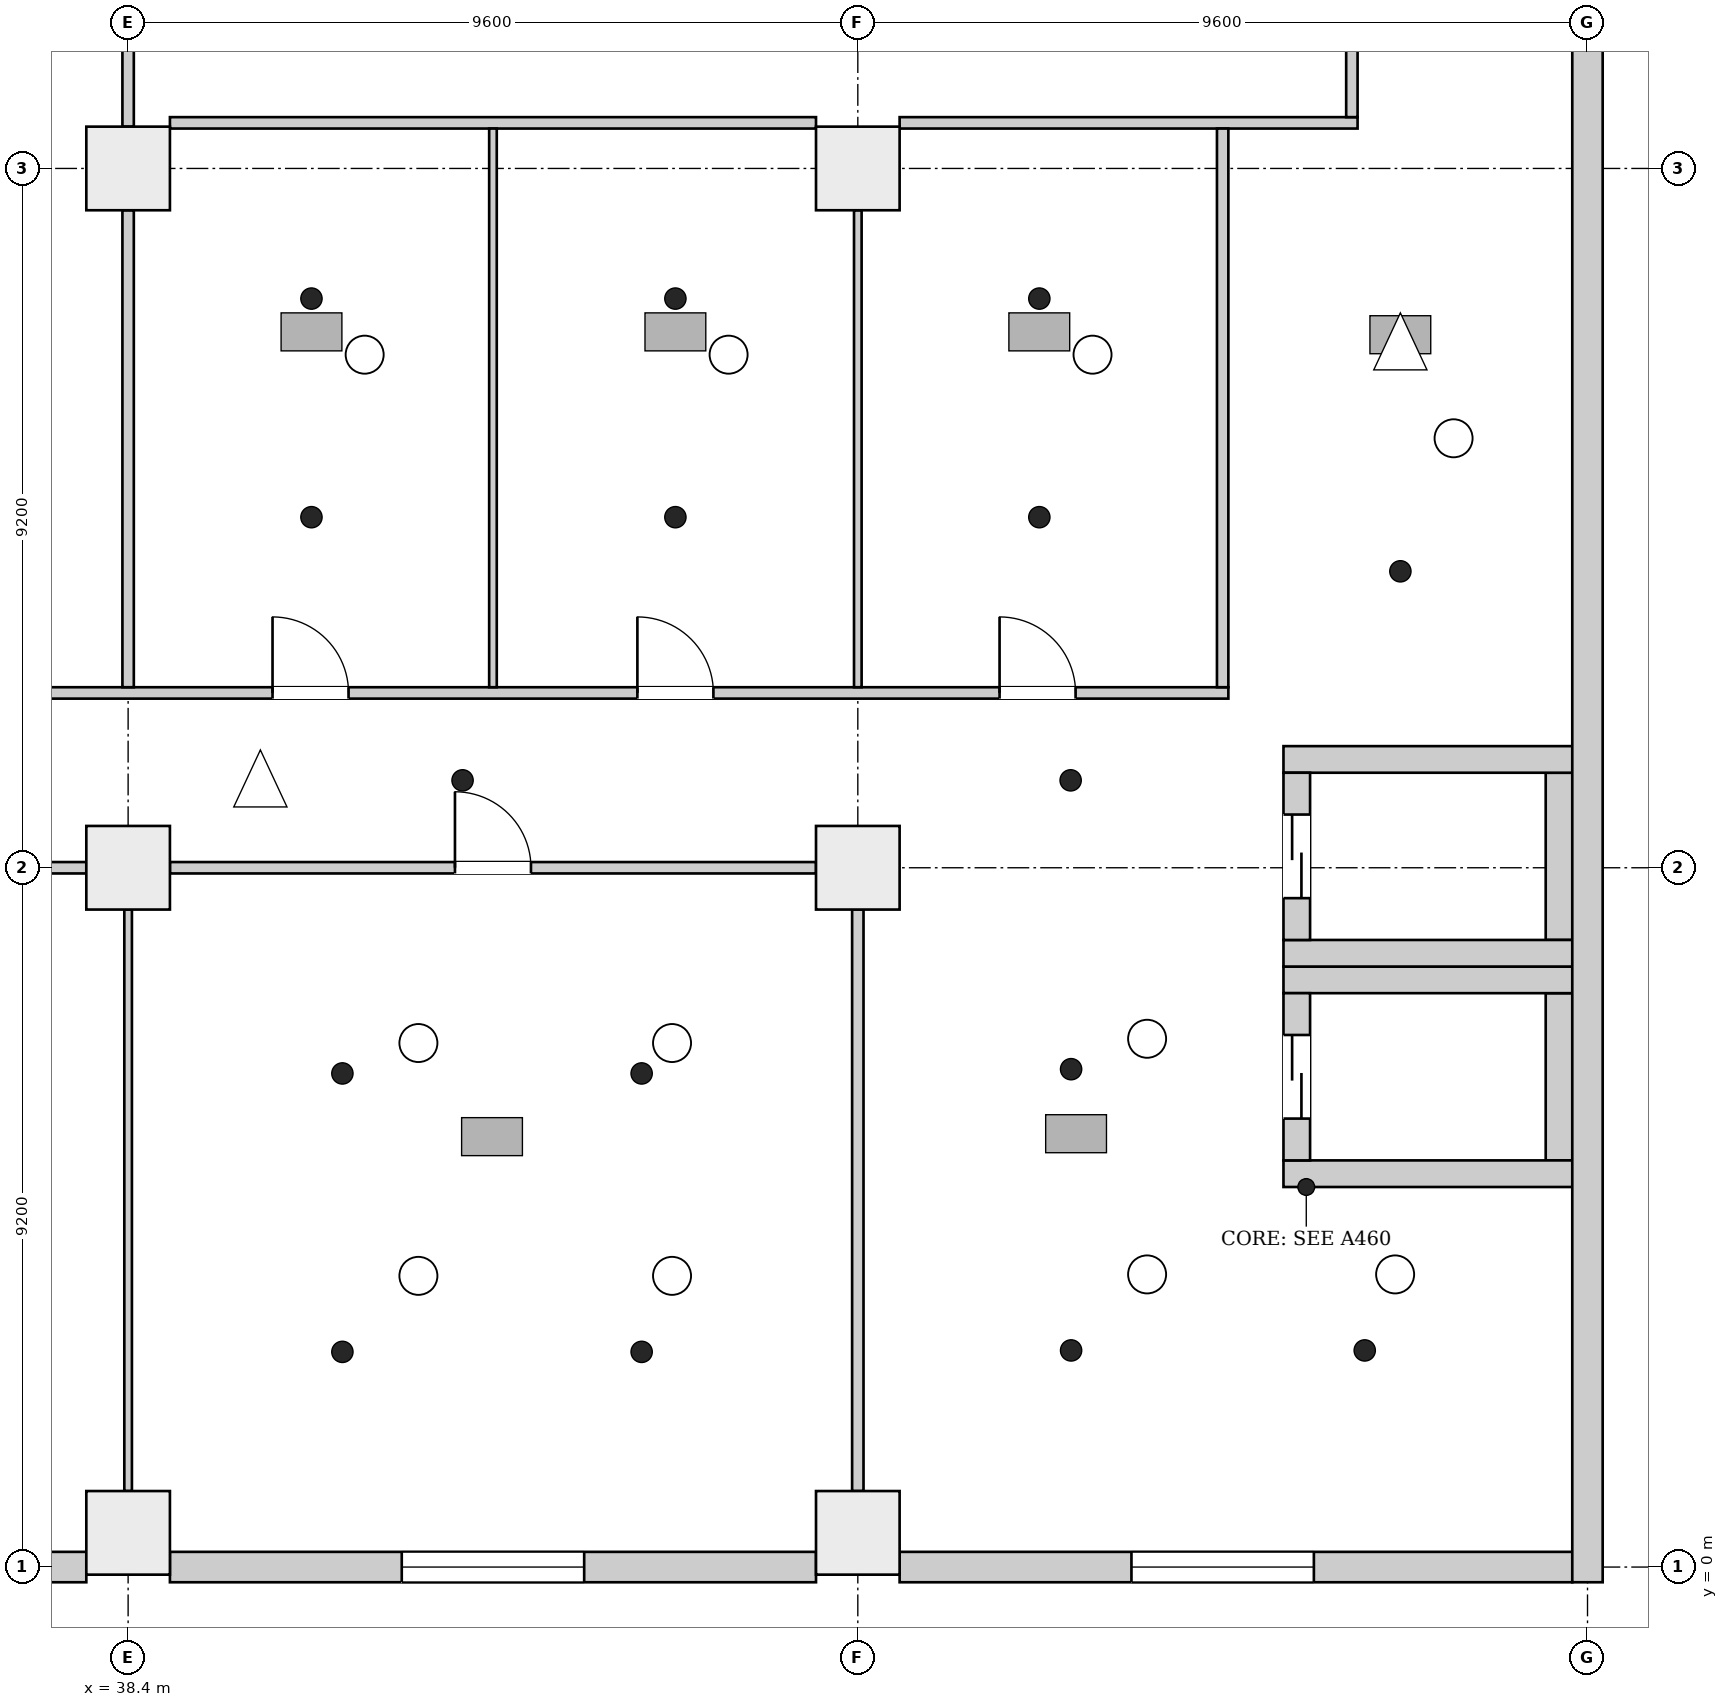
"""IFC4 building model, lengths in metres.
Left out: names, types, materials, properties, quantities, classifications, styles, units other than length and angle.
Written with IfcOpenShell. Run it as: python <this file> out.ifc"""

import sys

from ifc_helpers import new_model, si_unit, direction, frame, frame_2d, origin, origin_2d, place, context, subcontext, project, spatial, rectangle, extrude, element, fill, save


model = new_model("IFC4")
c1 = context("Model", 3, precision=1e-05, world=origin(), true_north=direction((0.0, 1.0)))
c2 = subcontext(c1, "Body", "Model", "MODEL_VIEW")
j1 = project(units=[si_unit("LENGTHUNIT", "METRE"), si_unit("PLANEANGLEUNIT", "RADIAN")], contexts=[c1])
p1 = place(None, origin())
s1 = spatial("IfcSite", under=j1, at=p1, CompositionType="ELEMENT")
p2 = place(p1, origin())
s2 = spatial("IfcBuilding", under=s1, at=p2, CompositionType="ELEMENT")
p3 = place(p2, frame((0.0, 0.0, 26.7)))
s3 = spatial("IfcBuildingStorey", under=s2, at=p3, CompositionType="ELEMENT", Elevation=26.7)
p4 = place(p3, frame((57.6, -0.2, 0.0), z_axis=(0.0, 0.0, 1.0), x_axis=(0.0, 1.0, 0.0)))
e1 = element("IfcWall", 1, at=p4, inside=s3, PredefinedType="SHEAR", context=c2, shape_type="SweptSolid", body=[
    extrude(rectangle(XDim=46.88, YDim=0.4, at=frame_2d((23.44, 0.0))), origin(), (0.0, 0.0, 1.0), 5.2),
])
for number, where, z_axis, x_axis in (
    (2, (53.6, 5.175, 0.0), (0.0, 0.0, 1.0), (1.0, 0.0, 0.0)),
    (3, (53.6, 7.725, 0.0), (0.0, 0.0, 1.0), (1.0, 0.0, 0.0)),
):
    element("IfcWall", number, at=place(p3, frame(where, z_axis=z_axis, x_axis=x_axis)), inside=s3, PredefinedType="SHEAR", context=c2, shape_type="SweptSolid", body=[
        extrude(rectangle(XDim=3.8, YDim=0.35, at=frame_2d((1.9, 0.0))), origin(), (0.0, 0.0, 1.0), 5.2),
    ])
p5 = place(p3, frame((53.775, 5.35, 0.0), z_axis=(0.0, 0.0, 1.0), x_axis=(0.0, 1.0, 0.0)))
e4 = element("IfcWall", 4, at=p5, inside=s3, PredefinedType="SHEAR", context=c2, shape_type="SweptSolid", body=[
    extrude(rectangle(XDim=2.2, YDim=0.35, at=frame_2d((1.1, 0.0))), origin(), (0.0, 0.0, 1.0), 5.2),
])
p6 = place(p5, frame((0.55, 0.0, 0.0)))
e5 = element("IfcOpeningElement", 5, at=p6, cuts=e4, PredefinedType="OPENING", context=c2, shape_type="SweptSolid", body=[
    extrude(rectangle(XDim=1.1, YDim=2.1, at=frame_2d((0.55, 1.05))), frame((0.0, 0.185, 0.0), z_axis=(0.0, -1.0, 0.0), x_axis=(1.0, 0.0, 0.0)), (0.0, 0.0, 1.0), 0.37),
])
p7 = place(p3, frame((57.225, 5.35, 0.0), z_axis=(0.0, 0.0, 1.0), x_axis=(0.0, 1.0, 0.0)))
e6 = element("IfcWall", 6, at=p7, inside=s3, PredefinedType="SHEAR", context=c2, shape_type="SweptSolid", body=[
    extrude(rectangle(XDim=2.2, YDim=0.35, at=frame_2d((1.1, 0.0))), origin(), (0.0, 0.0, 1.0), 5.2),
])
for number, where, z_axis, x_axis in (
    (7, (53.6, 8.075, 0.0), (0.0, 0.0, 1.0), (1.0, 0.0, 0.0)),
    (8, (53.6, 10.625, 0.0), (0.0, 0.0, 1.0), (1.0, 0.0, 0.0)),
):
    element("IfcWall", number, at=place(p3, frame(where, z_axis=z_axis, x_axis=x_axis)), inside=s3, PredefinedType="SHEAR", context=c2, shape_type="SweptSolid", body=[
        extrude(rectangle(XDim=3.8, YDim=0.35, at=frame_2d((1.9, 0.0))), origin(), (0.0, 0.0, 1.0), 5.2),
    ])
p8 = place(p3, frame((53.775, 8.25, 0.0), z_axis=(0.0, 0.0, 1.0), x_axis=(0.0, 1.0, 0.0)))
e9 = element("IfcWall", 9, at=p8, inside=s3, PredefinedType="SHEAR", context=c2, shape_type="SweptSolid", body=[
    extrude(rectangle(XDim=2.2, YDim=0.35, at=frame_2d((1.1, 0.0))), origin(), (0.0, 0.0, 1.0), 5.2),
])
p9 = place(p8, frame((0.55, 0.0, 0.0)))
e10 = element("IfcOpeningElement", 10, at=p9, cuts=e9, PredefinedType="OPENING", context=c2, shape_type="SweptSolid", body=[
    extrude(rectangle(XDim=1.1, YDim=2.1, at=frame_2d((0.55, 1.05))), frame((0.0, 0.185, 0.0), z_axis=(0.0, -1.0, 0.0), x_axis=(1.0, 0.0, 0.0)), (0.0, 0.0, 1.0), 0.37),
])
p10 = place(p3, frame((57.225, 8.25, 0.0), z_axis=(0.0, 0.0, 1.0), x_axis=(0.0, 1.0, 0.0)))
e11 = element("IfcWall", 11, at=p10, inside=s3, PredefinedType="SHEAR", context=c2, shape_type="SweptSolid", body=[
    extrude(rectangle(XDim=2.2, YDim=0.35, at=frame_2d((1.1, 0.0))), origin(), (0.0, 0.0, 1.0), 5.2),
])
for number, where, z_axis, x_axis in (
    (12, (38.4, 0.45, 0.0), (0.0, 0.0, 1.0), (1.0, 0.0, 0.0)),
    (13, (48.0, 0.45, 0.0), (0.0, 0.0, 1.0), (1.0, 0.0, 0.0)),
    (14, (38.4, 9.2, 0.0), (0.0, 0.0, 1.0), (1.0, 0.0, 0.0)),
    (15, (48.0, 9.2, 0.0), (0.0, 0.0, 1.0), (1.0, 0.0, 0.0)),
    (16, (38.4, 18.4, 0.0), (0.0, 0.0, 1.0), (1.0, 0.0, 0.0)),
    (17, (48.0, 18.4, 0.0), (0.0, 0.0, 1.0), (1.0, 0.0, 0.0)),
):
    element("IfcColumn", number, at=place(p3, frame(where, z_axis=z_axis, x_axis=x_axis)), inside=s3, PredefinedType="COLUMN", context=c2, shape_type="SweptSolid", body=[
        extrude(rectangle(XDim=1.1, YDim=1.1, at=origin_2d()), origin(), (0.0, 0.0, 1.0), 5.2),
    ])
p11 = place(p3, frame((29.35, 0.0, 0.0), z_axis=(0.0, 0.0, 1.0), x_axis=(1.0, 0.0, 0.0)))
e18 = element("IfcWall", 18, at=p11, inside=s3, PredefinedType="ELEMENTEDWALL", context=c2, shape_type="SweptSolid", body=[
    extrude(rectangle(XDim=8.5, YDim=0.4, at=frame_2d((4.25, 0.0))), origin(), (0.0, 0.0, 1.0), 4.85),
])
p12 = place(p11, frame((3.05, 0.0, 1.0)))
e19 = element("IfcOpeningElement", 19, at=p12, cuts=e18, PredefinedType="OPENING", context=c2, shape_type="SweptSolid", body=[
    extrude(rectangle(XDim=2.4, YDim=2.2, at=frame_2d((1.2, 1.1))), frame((0.0, 0.21, 0.0), z_axis=(0.0, -1.0, 0.0), x_axis=(1.0, 0.0, 0.0)), (0.0, 0.0, 1.0), 0.42),
])
p13 = place(p3, frame((38.95, 0.0, 0.0), z_axis=(0.0, 0.0, 1.0), x_axis=(1.0, 0.0, 0.0)))
e20 = element("IfcWall", 20, at=p13, inside=s3, PredefinedType="ELEMENTEDWALL", context=c2, shape_type="SweptSolid", body=[
    extrude(rectangle(XDim=8.5, YDim=0.4, at=frame_2d((4.25, 0.0))), origin(), (0.0, 0.0, 1.0), 4.85),
])
p14 = place(p13, frame((3.05, 0.0, 1.0)))
e21 = element("IfcOpeningElement", 21, at=p14, cuts=e20, PredefinedType="OPENING", context=c2, shape_type="SweptSolid", body=[
    extrude(rectangle(XDim=2.4, YDim=2.2, at=frame_2d((1.2, 1.1))), frame((0.0, 0.21, 0.0), z_axis=(0.0, -1.0, 0.0), x_axis=(1.0, 0.0, 0.0)), (0.0, 0.0, 1.0), 0.42),
])
p15 = place(p3, frame((48.55, 0.0, 0.0), z_axis=(0.0, 0.0, 1.0), x_axis=(1.0, 0.0, 0.0)))
e22 = element("IfcWall", 22, at=p15, inside=s3, PredefinedType="ELEMENTEDWALL", context=c2, shape_type="SweptSolid", body=[
    extrude(rectangle(XDim=8.85, YDim=0.4, at=frame_2d((4.425, 0.0))), origin(), (0.0, 0.0, 1.0), 4.85),
])
p16 = place(p15, frame((3.05, 0.0, 1.0)))
e23 = element("IfcOpeningElement", 23, at=p16, cuts=e22, PredefinedType="OPENING", context=c2, shape_type="SweptSolid", body=[
    extrude(rectangle(XDim=2.4, YDim=2.2, at=frame_2d((1.2, 1.1))), frame((0.0, 0.21, 0.0), z_axis=(0.0, -1.0, 0.0), x_axis=(1.0, 0.0, 0.0)), (0.0, 0.0, 1.0), 0.42),
])
p17 = place(p3, frame((27.206, 11.5, 0.0), z_axis=(0.0, 0.0, 1.0), x_axis=(1.0, 0.0, 0.0)))
e24 = element("IfcWall", 24, at=p17, inside=s3, PredefinedType="PARTITIONING", context=c2, shape_type="SweptSolid", body=[
    extrude(rectangle(XDim=25.669, YDim=0.15, at=frame_2d((12.834, 0.0))), origin(), (0.0, 0.0, 1.0), 4.85),
])
p18 = place(p17, frame((13.094, 0.0, 0.0)))
e25 = element("IfcOpeningElement", 25, at=p18, cuts=e24, PredefinedType="OPENING", context=c2, shape_type="SweptSolid", body=[
    extrude(rectangle(XDim=1.0, YDim=2.1, at=frame_2d((0.5, 1.05))), frame((0.0, 0.085, 0.0), z_axis=(0.0, -1.0, 0.0), x_axis=(1.0, 0.0, 0.0)), (0.0, 0.0, 1.0), 0.17),
])
p19 = place(p17, frame((17.894, 0.0, 0.0)))
e26 = element("IfcOpeningElement", 26, at=p19, cuts=e24, PredefinedType="OPENING", context=c2, shape_type="SweptSolid", body=[
    extrude(rectangle(XDim=1.0, YDim=2.1, at=frame_2d((0.5, 1.05))), frame((0.0, 0.085, 0.0), z_axis=(0.0, -1.0, 0.0), x_axis=(1.0, 0.0, 0.0)), (0.0, 0.0, 1.0), 0.17),
])
p20 = place(p17, frame((22.659, 0.0, 0.0)))
e27 = element("IfcOpeningElement", 27, at=p20, cuts=e24, PredefinedType="OPENING", context=c2, shape_type="SweptSolid", body=[
    extrude(rectangle(XDim=1.0, YDim=2.1, at=frame_2d((0.5, 1.05))), frame((0.0, 0.085, 0.0), z_axis=(0.0, -1.0, 0.0), x_axis=(1.0, 0.0, 0.0)), (0.0, 0.0, 1.0), 0.17),
])
p21 = place(p3, frame((29.35, 9.2, 0.0), z_axis=(0.0, 0.0, 1.0), x_axis=(1.0, 0.0, 0.0)))
e28 = element("IfcWall", 28, at=p21, inside=s3, PredefinedType="PARTITIONING", context=c2, shape_type="SweptSolid", body=[
    extrude(rectangle(XDim=8.5, YDim=0.15, at=frame_2d((4.25, 0.0))), origin(), (0.0, 0.0, 1.0), 4.45),
])
p22 = place(p21, frame((3.75, 0.0, 0.0)))
e29 = element("IfcOpeningElement", 29, at=p22, cuts=e28, PredefinedType="OPENING", context=c2, shape_type="SweptSolid", body=[
    extrude(rectangle(XDim=1.0, YDim=2.1, at=frame_2d((0.5, 1.05))), frame((0.0, 0.085, 0.0), z_axis=(0.0, -1.0, 0.0), x_axis=(1.0, 0.0, 0.0)), (0.0, 0.0, 1.0), 0.17),
])
p23 = place(p3, frame((38.4, 11.575, 0.0), z_axis=(0.0, 0.0, 1.0), x_axis=(0.0, 1.0, 0.0)))
e30 = element("IfcWall", 30, at=p23, inside=s3, PredefinedType="PARTITIONING", context=c2, shape_type="SweptSolid", body=[
    extrude(rectangle(XDim=6.275, YDim=0.15, at=frame_2d((3.138, 0.0))), origin(), (0.0, 0.0, 1.0), 4.45),
])
p24 = place(p3, frame((38.4, 18.95, 0.0), z_axis=(0.0, 0.0, 1.0), x_axis=(0.0, 1.0, 0.0)))
e31 = element("IfcWall", 31, at=p24, inside=s3, PredefinedType="PARTITIONING", context=c2, shape_type="SweptSolid", body=[
    extrude(rectangle(XDim=8.1, YDim=0.15, at=frame_2d((4.05, 0.0))), origin(), (0.0, 0.0, 1.0), 4.45),
])
p25 = place(p24, frame((3.55, 0.0, 0.0)))
e32 = element("IfcOpeningElement", 32, at=p25, cuts=e31, PredefinedType="OPENING", context=c2, shape_type="SweptSolid", body=[
    extrude(rectangle(XDim=1.0, YDim=2.1, at=frame_2d((0.5, 1.05))), frame((0.0, 0.085, 0.0), z_axis=(0.0, -1.0, 0.0), x_axis=(1.0, 0.0, 0.0)), (0.0, 0.0, 1.0), 0.17),
])
p26 = place(p3, frame((38.4, 1.0, 0.0), z_axis=(0.0, 0.0, 1.0), x_axis=(0.0, 1.0, 0.0)))
e33 = element("IfcWall", 33, at=p26, inside=s3, PredefinedType="PARTITIONING", context=c2, shape_type="SweptSolid", body=[
    extrude(rectangle(XDim=7.65, YDim=0.1, at=frame_2d((3.825, 0.0))), origin(), (0.0, 0.0, 1.0), 4.45),
])
p27 = place(p3, frame((38.95, 9.2, 0.0), z_axis=(0.0, 0.0, 1.0), x_axis=(1.0, 0.0, 0.0)))
e34 = element("IfcWall", 34, at=p27, inside=s3, PredefinedType="PARTITIONING", context=c2, shape_type="SweptSolid", body=[
    extrude(rectangle(XDim=8.5, YDim=0.15, at=frame_2d((4.25, 0.0))), origin(), (0.0, 0.0, 1.0), 4.45),
])
p28 = place(p27, frame((3.75, 0.0, 0.0)))
e35 = element("IfcOpeningElement", 35, at=p28, cuts=e34, PredefinedType="OPENING", context=c2, shape_type="SweptSolid", body=[
    extrude(rectangle(XDim=1.0, YDim=2.1, at=frame_2d((0.5, 1.05))), frame((0.0, 0.085, 0.0), z_axis=(0.0, -1.0, 0.0), x_axis=(1.0, 0.0, 0.0)), (0.0, 0.0, 1.0), 0.17),
])
p29 = place(p3, frame((38.95, 19.0, 0.0), z_axis=(0.0, 0.0, 1.0), x_axis=(1.0, 0.0, 0.0)))
e36 = element("IfcWall", 36, at=p29, inside=s3, PredefinedType="PARTITIONING", context=c2, shape_type="SweptSolid", body=[
    extrude(rectangle(XDim=8.5, YDim=0.15, at=frame_2d((4.25, 0.0))), origin(), (0.0, 0.0, 1.0), 4.85),
])
p30 = place(p3, frame((43.2, 11.575, 0.0), z_axis=(0.0, 0.0, 1.0), x_axis=(0.0, 1.0, 0.0)))
e37 = element("IfcWall", 37, at=p30, inside=s3, PredefinedType="PARTITIONING", context=c2, shape_type="SweptSolid", body=[
    extrude(rectangle(XDim=7.35, YDim=0.1, at=frame_2d((3.675, 0.0))), origin(), (0.0, 0.0, 1.0), 4.85),
])
p31 = place(p3, frame((48.0, 1.0, 0.0), z_axis=(0.0, 0.0, 1.0), x_axis=(0.0, 1.0, 0.0)))
e38 = element("IfcWall", 38, at=p31, inside=s3, PredefinedType="PARTITIONING", context=c2, shape_type="SweptSolid", body=[
    extrude(rectangle(XDim=7.65, YDim=0.15, at=frame_2d((3.825, 0.0))), origin(), (0.0, 0.0, 1.0), 4.85),
])
p32 = place(p3, frame((48.0, 11.575, 0.0), z_axis=(0.0, 0.0, 1.0), x_axis=(0.0, 1.0, 0.0)))
e39 = element("IfcWall", 39, at=p32, inside=s3, PredefinedType="PARTITIONING", context=c2, shape_type="SweptSolid", body=[
    extrude(rectangle(XDim=6.275, YDim=0.1, at=frame_2d((3.138, 0.0))), origin(), (0.0, 0.0, 1.0), 4.85),
])
p33 = place(p3, frame((48.55, 19.0, 0.0), z_axis=(0.0, 0.0, 1.0), x_axis=(1.0, 0.0, 0.0)))
e40 = element("IfcWall", 40, at=p33, inside=s3, PredefinedType="PARTITIONING", context=c2, shape_type="SweptSolid", body=[
    extrude(rectangle(XDim=6.025, YDim=0.15, at=frame_2d((3.012, 0.0))), origin(), (0.0, 0.0, 1.0), 4.85),
])
p34 = place(p3, frame((52.8, 11.575, 0.0), z_axis=(0.0, 0.0, 1.0), x_axis=(0.0, 1.0, 0.0)))
e41 = element("IfcWall", 41, at=p34, inside=s3, PredefinedType="PARTITIONING", context=c2, shape_type="SweptSolid", body=[
    extrude(rectangle(XDim=7.35, YDim=0.15, at=frame_2d((3.675, 0.0))), origin(), (0.0, 0.0, 1.0), 4.85),
])
p35 = place(p3, frame((54.5, 19.075, 0.0), z_axis=(0.0, 0.0, 1.0), x_axis=(0.0, 1.0, 0.0)))
e42 = element("IfcWall", 42, at=p35, inside=s3, PredefinedType="PARTITIONING", context=c2, shape_type="SweptSolid", body=[
    extrude(rectangle(XDim=8.0, YDim=0.15, at=frame_2d((4.0, 0.0))), origin(), (0.0, 0.0, 1.0), 4.85),
])
p36 = place(p14, origin())
e43 = element("IfcWindow", 43, at=p36, inside=s3, PartitioningType="SINGLE_PANEL", PredefinedType="WINDOW", context=c2, shape_type="SweptSolid", body=[
    extrude(rectangle(XDim=2.4, YDim=2.2, at=frame_2d((1.2, 1.1))), frame((0.0, 0.03, 0.0), z_axis=(0.0, -1.0, 0.0), x_axis=(1.0, 0.0, 0.0)), (0.0, 0.0, 1.0), 0.06),
])
fill(e21, e43)
p37 = place(p16, origin())
e44 = element("IfcWindow", 44, at=p37, inside=s3, PartitioningType="SINGLE_PANEL", PredefinedType="WINDOW", context=c2, shape_type="SweptSolid", body=[
    extrude(rectangle(XDim=2.4, YDim=2.2, at=frame_2d((1.2, 1.1))), frame((0.0, 0.03, 0.0), z_axis=(0.0, -1.0, 0.0), x_axis=(1.0, 0.0, 0.0)), (0.0, 0.0, 1.0), 0.06),
])
fill(e23, e44)
p38 = place(p6, origin())
e45 = element("IfcDoor", 45, at=p38, inside=s3, OperationType="DOUBLE_DOOR_SLIDING", PredefinedType="DOOR", context=c2, shape_type="SweptSolid", body=[
    extrude(rectangle(XDim=1.1, YDim=2.1, at=frame_2d((0.55, 1.05))), frame((0.0, 0.025, 0.0), z_axis=(0.0, -1.0, 0.0), x_axis=(1.0, 0.0, 0.0)), (0.0, 0.0, 1.0), 0.05),
])
fill(e5, e45)
p39 = place(p9, origin())
e46 = element("IfcDoor", 46, at=p39, inside=s3, OperationType="DOUBLE_DOOR_SLIDING", PredefinedType="DOOR", context=c2, shape_type="SweptSolid", body=[
    extrude(rectangle(XDim=1.1, YDim=2.1, at=frame_2d((0.55, 1.05))), frame((0.0, 0.025, 0.0), z_axis=(0.0, -1.0, 0.0), x_axis=(1.0, 0.0, 0.0)), (0.0, 0.0, 1.0), 0.05),
])
fill(e10, e46)
p40 = place(p18, origin())
e47 = element("IfcDoor", 47, at=p40, inside=s3, OperationType="SINGLE_SWING_RIGHT", PredefinedType="DOOR", context=c2, shape_type="SweptSolid", body=[
    extrude(rectangle(XDim=1.0, YDim=2.1, at=frame_2d((0.5, 1.05))), frame((0.0, 0.025, 0.0), z_axis=(0.0, -1.0, 0.0), x_axis=(1.0, 0.0, 0.0)), (0.0, 0.0, 1.0), 0.05),
])
fill(e25, e47)
p41 = place(p19, origin())
e48 = element("IfcDoor", 48, at=p41, inside=s3, OperationType="SINGLE_SWING_RIGHT", PredefinedType="DOOR", context=c2, shape_type="SweptSolid", body=[
    extrude(rectangle(XDim=1.0, YDim=2.1, at=frame_2d((0.5, 1.05))), frame((0.0, 0.025, 0.0), z_axis=(0.0, -1.0, 0.0), x_axis=(1.0, 0.0, 0.0)), (0.0, 0.0, 1.0), 0.05),
])
fill(e26, e48)
p42 = place(p20, origin())
e49 = element("IfcDoor", 49, at=p42, inside=s3, OperationType="SINGLE_SWING_RIGHT", PredefinedType="DOOR", context=c2, shape_type="SweptSolid", body=[
    extrude(rectangle(XDim=1.0, YDim=2.1, at=frame_2d((0.5, 1.05))), frame((0.0, 0.025, 0.0), z_axis=(0.0, -1.0, 0.0), x_axis=(1.0, 0.0, 0.0)), (0.0, 0.0, 1.0), 0.05),
])
fill(e27, e49)
p43 = place(p28, origin())
e50 = element("IfcDoor", 50, at=p43, inside=s3, OperationType="SINGLE_SWING_LEFT", PredefinedType="DOOR", context=c2, shape_type="SweptSolid", body=[
    extrude(rectangle(XDim=1.0, YDim=2.1, at=frame_2d((0.5, 1.05))), frame((0.0, 0.025, 0.0), z_axis=(0.0, -1.0, 0.0), x_axis=(1.0, 0.0, 0.0)), (0.0, 0.0, 1.0), 0.05),
])
fill(e35, e50)
save(model, sys.argv[1])
